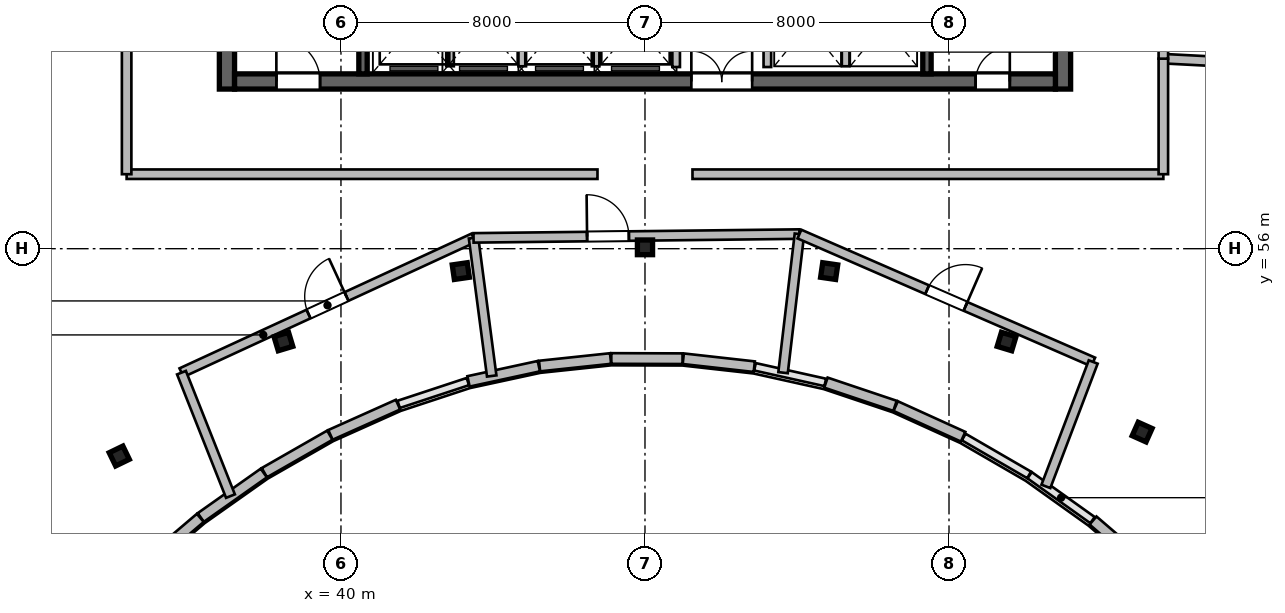
"""IFC4 building model, lengths in metres.
Left out: names, types, materials, properties, quantities, classifications, styles, units other than length and angle.
Written with IfcOpenShell. Run it as: python <this file> out.ifc"""

import sys

from ifc_helpers import new_model, si_unit, direction, frame, frame_2d, origin, origin_2d, place, context, subcontext, project, spatial, rectangle, i_section, extrude, source, transform, mapped, element, fill, save


model = new_model("IFC4")
c1 = context("Model", 3, precision=1e-05, world=origin(), true_north=direction((0.0, 1.0)))
c2 = subcontext(c1, "Body", "Model", "MODEL_VIEW")
j1 = project(units=[si_unit("LENGTHUNIT", "METRE"), si_unit("PLANEANGLEUNIT", "RADIAN")], contexts=[c1])
p1 = place(None, origin())
s1 = spatial("IfcSite", under=j1, at=p1, CompositionType="ELEMENT")
p2 = place(p1, origin())
s2 = spatial("IfcBuilding", under=s1, at=p2, CompositionType="ELEMENT")
p3 = place(p2, frame((0.0, 0.0, 264.0)))
s3 = spatial("IfcBuildingStorey", under=s2, at=p3, CompositionType="ELEMENT", Elevation=264.0)
m1 = source(origin(), c2, "Body", "SweptSolid", [
    extrude(rectangle(XDim=12.0, YDim=0.4, at=frame_2d((6.0, 0.0))), origin(), (0.0, 0.0, 1.0), 3.9),
])
for number, where, z_axis, x_axis in (
    (1, (37.0, 60.2, 0.0), (0.0, 0.0, 1.0), (0.0, 1.0, 0.0)),
    (2, (59.0, 60.2, 0.0), (0.0, 0.0, 1.0), (0.0, 1.0, 0.0)),
):
    element("IfcWall", number, at=place(p3, frame(where, z_axis=z_axis, x_axis=x_axis)), inside=s3, PredefinedType="SHEAR", context=c2, shape_type="MappedRepresentation", body=[
        mapped(m1, transform((0.0, 0.0, 0.0), scale=1.0)),
    ])
m2 = source(origin(), c2, "Body", "SweptSolid", [
    extrude(rectangle(XDim=21.6, YDim=0.4, at=frame_2d((10.8, 0.0))), origin(), (0.0, 0.0, 1.0), 3.9),
])
p4 = place(p3, frame((37.2, 60.4, 0.0), z_axis=(0.0, 0.0, 1.0), x_axis=(1.0, 0.0, 0.0)))
e3 = element("IfcWall", 3, at=p4, inside=s3, PredefinedType="SHEAR", context=c2, shape_type="MappedRepresentation", body=[
    mapped(m2, transform((0.0, 0.0, 0.0), scale=1.0)),
])
p5 = place(p4, frame((1.1, 0.0, 0.0)))
e4 = element("IfcOpeningElement", 4, at=p5, cuts=e3, PredefinedType="OPENING", context=c2, shape_type="SweptSolid", body=[
    extrude(rectangle(XDim=1.15, YDim=2.15, at=frame_2d((0.575, 1.075))), frame((0.0, 0.21, 0.0), z_axis=(0.0, -1.0, 0.0), x_axis=(1.0, 0.0, 0.0)), (0.0, 0.0, 1.0), 0.42),
])
p6 = place(p4, frame((19.5, 0.0, 0.0)))
e5 = element("IfcOpeningElement", 5, at=p6, cuts=e3, PredefinedType="OPENING", context=c2, shape_type="SweptSolid", body=[
    extrude(rectangle(XDim=0.9, YDim=2.1, at=frame_2d((0.45, 1.05))), frame((0.0, 0.21, 0.0), z_axis=(0.0, -1.0, 0.0), x_axis=(1.0, 0.0, 0.0)), (0.0, 0.0, 1.0), 0.42),
])
p7 = place(p4, frame((12.02, 0.0, 0.0)))
e6 = element("IfcOpeningElement", 6, at=p7, cuts=e3, PredefinedType="OPENING", context=c2, shape_type="SweptSolid", body=[
    extrude(rectangle(XDim=1.6, YDim=2.15, at=frame_2d((0.8, 1.075))), frame((0.0, 0.21, 0.0), z_axis=(0.0, -1.0, 0.0), x_axis=(1.0, 0.0, 0.0)), (0.0, 0.0, 1.0), 0.42),
])
m3 = source(origin(), c2, "Body", "SweptSolid", [
    extrude(rectangle(XDim=11.2, YDim=0.22, at=frame_2d((5.6, 0.0))), origin(), (0.0, 0.0, 1.0), 3.9),
])
p8 = place(p3, frame((40.58, 60.6, 0.0), z_axis=(0.0, 0.0, 1.0), x_axis=(0.0, 1.0, 0.0)))
e7 = element("IfcWall", 7, at=p8, inside=s3, PredefinedType="SHEAR", context=c2, shape_type="MappedRepresentation", body=[
    mapped(m3, transform((0.0, 0.0, 0.0), scale=1.0)),
])
p9 = place(p3, frame((55.42, 60.6, 0.0), z_axis=(0.0, 0.0, 1.0), x_axis=(0.0, 1.0, 0.0)))
e8 = element("IfcWall", 8, at=p9, inside=s3, PredefinedType="SHEAR", context=c2, shape_type="MappedRepresentation", body=[
    mapped(m3, transform((0.0, 0.0, 0.0), scale=1.0)),
])
p10 = place(p9, frame((9.645, 0.0, 0.0)))
e9 = element("IfcOpeningElement", 9, at=p10, cuts=e8, PredefinedType="OPENING", context=c2, shape_type="SweptSolid", body=[
    extrude(rectangle(XDim=1.15, YDim=2.15, at=frame_2d((0.575, 1.075))), frame((0.0, 0.12, 0.0), z_axis=(0.0, -1.0, 0.0), x_axis=(1.0, 0.0, 0.0)), (0.0, 0.0, 1.0), 0.24),
])
m4 = source(origin(), c2, "Body", "SweptSolid", [
    extrude(i_section(OverallWidth=0.399, OverallDepth=0.387, WebThickness=0.021, FlangeThickness=0.033, at=origin_2d()), origin(), (0.0, 0.0, 1.0), 3.9),
])
for number, where, z_axis, x_axis in (
    (10, (34.166, 50.545, 0.0), (0.0, 0.0, 1.0), (-0.436, 0.9, 0.0)),
    (11, (38.485, 53.558, 0.0), (0.0, 0.0, 1.0), (-0.289, 0.957, 0.0)),
    (12, (43.154, 55.411, 0.0), (0.0, 0.0, 1.0), (-0.143, 0.99, 0.0)),
    (13, (48.0, 56.036, 0.0), (0.0, 0.0, 1.0), (0.0, 1.0, 0.0)),
    (14, (52.846, 55.411, 0.0), (0.0, 0.0, 1.0), (0.143, 0.99, 0.0)),
    (15, (57.515, 53.558, 0.0), (0.0, 0.0, 1.0), (0.289, 0.957, 0.0)),
    (16, (61.082, 51.175, 0.0), (0.0, 0.0, 1.0), (0.409, 0.912, 0.0)),
):
    element("IfcColumn", number, at=place(p3, frame(where, z_axis=z_axis, x_axis=x_axis)), inside=s3, PredefinedType="COLUMN", context=c2, shape_type="MappedRepresentation", body=[
        mapped(m4, transform((0.0, 0.0, 0.0), scale=1.0)),
    ])
m5 = source(origin(), c2, "Body", "SweptSolid", [
    extrude(rectangle(XDim=2.04, YDim=0.28, at=frame_2d((1.02, 0.0))), origin(), (0.0, 0.0, 1.0), 3.65),
])
p11 = place(p3, frame((61.337, 47.519, 0.0), z_axis=(0.0, 0.0, 1.0), x_axis=(-0.758402847119, 0.651786101019, 0.0)))
e17 = element("IfcWall", 17, at=p11, inside=s3, PredefinedType="SOLIDWALL", context=c2, shape_type="MappedRepresentation", body=[
    mapped(m5, transform((0.0, 0.0, 0.0), scale=1.0)),
])
m6 = source(origin(), c2, "Body", "SweptSolid", [
    extrude(rectangle(XDim=1.95, YDim=0.28, at=frame_2d((0.975, 0.0))), origin(), (0.0, 0.0, 1.0), 3.65),
])
p12 = place(p3, frame((56.372, 51.052, 0.0), z_axis=(0.0, 0.0, 1.0), x_axis=(-0.910507945155, 0.413491574048, 0.0)))
e18 = element("IfcWall", 18, at=p12, inside=s3, PredefinedType="SOLIDWALL", context=c2, shape_type="MappedRepresentation", body=[
    mapped(m6, transform((0.0, 0.0, 0.0), scale=1.0)),
])
m7 = source(origin(), c2, "Body", "SweptSolid", [
    extrude(rectangle(XDim=1.918, YDim=0.28, at=frame_2d((0.959, 0.0))), origin(), (0.0, 0.0, 1.0), 3.65),
])
p13 = place(p3, frame((54.579, 51.865, 0.0), z_axis=(0.0, 0.0, 1.0), x_axis=(-0.947916697588, 0.318518342381, 0.0)))
e19 = element("IfcWall", 19, at=p13, inside=s3, PredefinedType="SOLIDWALL", context=c2, shape_type="MappedRepresentation", body=[
    mapped(m7, transform((0.0, 0.0, 0.0), scale=1.0)),
])
m8 = source(origin(), c2, "Body", "SweptSolid", [
    extrude(rectangle(XDim=1.879, YDim=0.28, at=frame_2d((0.94, 0.0))), origin(), (0.0, 0.0, 1.0), 3.65),
])
p14 = place(p3, frame((50.875, 52.896, 0.0), z_axis=(0.0, 0.0, 1.0), x_axis=(-0.993797887127, 0.111201436782, 0.0)))
e20 = element("IfcWall", 20, at=p14, inside=s3, PredefinedType="SOLIDWALL", context=c2, shape_type="MappedRepresentation", body=[
    mapped(m8, transform((0.0, 0.0, 0.0), scale=1.0)),
])
m9 = source(origin(), c2, "Body", "SweptSolid", [
    extrude(rectangle(XDim=1.874, YDim=0.28, at=frame_2d((0.937, 0.0))), origin(), (0.0, 0.0, 1.0), 3.65),
])
p15 = place(p3, frame((48.988, 53.106, 0.0), z_axis=(0.0, 0.0, 1.0), x_axis=(-0.999995893899, 0.002865690982, 0.0)))
e21 = element("IfcWall", 21, at=p15, inside=s3, PredefinedType="SOLIDWALL", context=c2, shape_type="MappedRepresentation", body=[
    mapped(m9, transform((0.0, 0.0, 0.0), scale=1.0)),
])
m10 = source(origin(), c2, "Body", "SweptSolid", [
    extrude(rectangle(XDim=1.879, YDim=0.28, at=frame_2d((0.939, 0.0))), origin(), (0.0, 0.0, 1.0), 3.65),
])
p16 = place(p3, frame((47.094, 53.11, 0.0), z_axis=(0.0, 0.0, 1.0), x_axis=(-0.994431872813, -0.105381451568, 0.0)))
e22 = element("IfcWall", 22, at=p16, inside=s3, PredefinedType="SOLIDWALL", context=c2, shape_type="MappedRepresentation", body=[
    mapped(m10, transform((0.0, 0.0, 0.0), scale=1.0)),
])
m11 = source(origin(), c2, "Body", "SweptSolid", [
    extrude(rectangle(XDim=1.893, YDim=0.28, at=frame_2d((0.947, 0.0))), origin(), (0.0, 0.0, 1.0), 3.65),
])
p17 = place(p3, frame((45.207, 52.909, 0.0), z_axis=(0.0, 0.0, 1.0), x_axis=(-0.977379595344, -0.21149261596, 0.0)))
e23 = element("IfcWall", 23, at=p17, inside=s3, PredefinedType="SOLIDWALL", context=c2, shape_type="MappedRepresentation", body=[
    mapped(m11, transform((0.0, 0.0, 0.0), scale=1.0)),
])
m12 = source(origin(), c2, "Body", "SweptSolid", [
    extrude(rectangle(XDim=1.948, YDim=0.28, at=frame_2d((0.974, 0.0))), origin(), (0.0, 0.0, 1.0), 3.65),
])
p18 = place(p3, frame((41.501, 51.897, 0.0), z_axis=(0.0, 0.0, 1.0), x_axis=(-0.912712483043, -0.408602402461, 0.0)))
e24 = element("IfcWall", 24, at=p18, inside=s3, PredefinedType="SOLIDWALL", context=c2, shape_type="MappedRepresentation", body=[
    mapped(m12, transform((0.0, 0.0, 0.0), scale=1.0)),
])
m13 = source(origin(), c2, "Body", "SweptSolid", [
    extrude(rectangle(XDim=1.986, YDim=0.28, at=frame_2d((0.993, 0.0))), origin(), (0.0, 0.0, 1.0), 3.65),
])
p19 = place(p3, frame((39.708, 51.093, 0.0), z_axis=(0.0, 0.0, 1.0), x_axis=(-0.867940364671, -0.496668423976, 0.0)))
e25 = element("IfcWall", 25, at=p19, inside=s3, PredefinedType="SOLIDWALL", context=c2, shape_type="MappedRepresentation", body=[
    mapped(m13, transform((0.0, 0.0, 0.0), scale=1.0)),
])
m14 = source(origin(), c2, "Body", "SweptSolid", [
    extrude(rectangle(XDim=2.03, YDim=0.28, at=frame_2d((1.015, 0.0))), origin(), (0.0, 0.0, 1.0), 3.65),
])
p20 = place(p3, frame((37.969, 50.097, 0.0), z_axis=(0.0, 0.0, 1.0), x_axis=(-0.816987864272, -0.576654861796, 0.0)))
e26 = element("IfcWall", 26, at=p20, inside=s3, PredefinedType="SOLIDWALL", context=c2, shape_type="MappedRepresentation", body=[
    mapped(m14, transform((0.0, 0.0, 0.0), scale=1.0)),
])
m15 = source(origin(), c2, "Body", "SweptSolid", [
    extrude(rectangle(XDim=2.078, YDim=0.28, at=frame_2d((1.039, 0.0))), origin(), (0.0, 0.0, 1.0), 3.65),
])
p21 = place(p3, frame((36.298, 48.917, 0.0), z_axis=(0.0, 0.0, 1.0), x_axis=(-0.761475215802, -0.648194026291, 0.0)))
e27 = element("IfcWall", 27, at=p21, inside=s3, PredefinedType="SOLIDWALL", context=c2, shape_type="MappedRepresentation", body=[
    mapped(m15, transform((0.0, 0.0, 0.0), scale=1.0)),
])
m16 = source(origin(), c2, "Body", "SweptSolid", [
    extrude(rectangle(XDim=2.24, YDim=0.2, at=frame_2d((1.12, 0.0))), origin(), (0.0, 0.0, 1.0), 3.65),
])
for number, where, z_axis, x_axis in (
    (28, (48.82, 60.78, 0.0), (0.0, 0.0, 1.0), (0.0, 1.0, 0.0)),
    (29, (51.22, 60.78, 0.0), (0.0, 0.0, 1.0), (0.0, 1.0, 0.0)),
):
    element("IfcWall", number, at=place(p3, frame(where, z_axis=z_axis, x_axis=x_axis)), inside=s3, PredefinedType="SOLIDWALL", context=c2, shape_type="MappedRepresentation", body=[
        mapped(m16, transform((0.0, 0.0, 0.0), scale=1.0)),
    ])
m17 = source(origin(), c2, "Body", "SweptSolid", [
    extrude(rectangle(XDim=2.2, YDim=0.2, at=frame_2d((1.1, 0.0))), origin(), (0.0, 0.0, 1.0), 3.65),
])
for number, where, z_axis, x_axis in (
    (30, (42.87, 60.8, 0.0), (0.0, 0.0, 1.0), (0.0, 1.0, 0.0)),
    (31, (44.77, 60.8, 0.0), (0.0, 0.0, 1.0), (0.0, 1.0, 0.0)),
    (32, (46.7, 60.8, 0.0), (0.0, 0.0, 1.0), (0.0, 1.0, 0.0)),
    (33, (53.28, 60.8, 0.0), (0.0, 0.0, 1.0), (0.0, 1.0, 0.0)),
):
    element("IfcWall", number, at=place(p3, frame(where, z_axis=z_axis, x_axis=x_axis)), inside=s3, PredefinedType="SOLIDWALL", context=c2, shape_type="MappedRepresentation", body=[
        mapped(m17, transform((0.0, 0.0, 0.0), scale=1.0)),
    ])
m18 = source(origin(), c2, "Body", "SweptSolid", [
    extrude(rectangle(XDim=8.464, YDim=0.25, at=frame_2d((4.232, 0.0))), origin(), (0.0, 0.0, 1.0), 3.65),
])
p22 = place(p3, frame((35.803, 52.738, 0.0), z_axis=(0.0, 0.0, 1.0), x_axis=(0.90801678306, 0.418933791524, 0.0)))
e34 = element("IfcWall", 34, at=p22, inside=s3, PredefinedType="PARTITIONING", context=c2, shape_type="MappedRepresentation", body=[
    mapped(m18, transform((0.0, 0.0, 0.0), scale=1.0)),
])
p23 = place(p22, frame((3.682, 0.0, 0.0)))
e35 = element("IfcOpeningElement", 35, at=p23, cuts=e34, PredefinedType="OPENING", context=c2, shape_type="SweptSolid", body=[
    extrude(rectangle(XDim=1.1, YDim=2.15, at=frame_2d((0.55, 1.075))), frame((0.0, 0.135, 0.0), z_axis=(0.0, -1.0, 0.0), x_axis=(1.0, 0.0, 0.0)), (0.0, 0.0, 1.0), 0.27),
])
m19 = source(origin(), c2, "Body", "SweptSolid", [
    extrude(rectangle(XDim=3.495, YDim=0.25, at=frame_2d((1.747, 0.0))), origin(), (0.0, 0.0, 1.0), 3.65),
])
p24 = place(p3, frame((37.092, 49.49, 0.0), z_axis=(0.0, 0.0, 1.0), x_axis=(-0.368859890644, 0.929485008526, 0.0)))
e36 = element("IfcWall", 36, at=p24, inside=s3, PredefinedType="PARTITIONING", context=c2, shape_type="MappedRepresentation", body=[
    mapped(m19, transform((0.0, 0.0, 0.0), scale=1.0)),
])
m20 = source(origin(), c2, "Body", "SweptSolid", [
    extrude(rectangle(XDim=3.665, YDim=0.25, at=frame_2d((1.832, 0.0))), origin(), (0.0, 0.0, 1.0), 3.65),
])
p25 = place(p3, frame((43.967, 52.651, 0.0), z_axis=(0.0, 0.0, 1.0), x_axis=(-0.130509659129, 0.991447037856, 0.0)))
e37 = element("IfcWall", 37, at=p25, inside=s3, PredefinedType="PARTITIONING", context=c2, shape_type="MappedRepresentation", body=[
    mapped(m20, transform((0.0, 0.0, 0.0), scale=1.0)),
])
m21 = source(origin(), c2, "Body", "SweptSolid", [
    extrude(rectangle(XDim=8.576, YDim=0.25, at=frame_2d((4.288, 0.0))), origin(), (0.0, 0.0, 1.0), 3.65),
])
p26 = place(p3, frame((43.489, 56.284, 0.0), z_axis=(0.0, 0.0, 1.0), x_axis=(0.999931553434, 0.011699933624, 0.0)))
e38 = element("IfcWall", 38, at=p26, inside=s3, PredefinedType="PARTITIONING", context=c2, shape_type="MappedRepresentation", body=[
    mapped(m21, transform((0.0, 0.0, 0.0), scale=1.0)),
])
p27 = place(p26, frame((2.988, 0.0, 0.0)))
e39 = element("IfcOpeningElement", 39, at=p27, cuts=e38, PredefinedType="OPENING", context=c2, shape_type="SweptSolid", body=[
    extrude(rectangle(XDim=1.1, YDim=2.15, at=frame_2d((0.55, 1.075))), frame((0.0, 0.135, 0.0), z_axis=(0.0, -1.0, 0.0), x_axis=(1.0, 0.0, 0.0)), (0.0, 0.0, 1.0), 0.27),
])
m22 = source(origin(), c2, "Body", "SweptSolid", [
    extrude(rectangle(XDim=3.672, YDim=0.25, at=frame_2d((1.836, 0.0))), origin(), (0.0, 0.0, 1.0), 3.65),
])
p28 = place(p3, frame((51.633, 52.738, 0.0), z_axis=(0.0, 0.0, 1.0), x_axis=(0.117362064027, 0.993089193339, 0.0)))
e40 = element("IfcWall", 40, at=p28, inside=s3, PredefinedType="PARTITIONING", context=c2, shape_type="MappedRepresentation", body=[
    mapped(m22, transform((0.0, 0.0, 0.0), scale=1.0)),
])
m23 = source(origin(), c2, "Body", "SweptSolid", [
    extrude(rectangle(XDim=8.431, YDim=0.25, at=frame_2d((4.216, 0.0))), origin(), (0.0, 0.0, 1.0), 3.65),
])
p29 = place(p3, frame((52.064, 56.385, 0.0), z_axis=(0.0, 0.0, 1.0), x_axis=(0.916868304583, -0.399189819574, 0.0)))
e41 = element("IfcWall", 41, at=p29, inside=s3, PredefinedType="PARTITIONING", context=c2, shape_type="MappedRepresentation", body=[
    mapped(m23, transform((0.0, 0.0, 0.0), scale=1.0)),
])
p30 = place(p29, frame((3.666, 0.0, 0.0)))
e42 = element("IfcOpeningElement", 42, at=p30, cuts=e41, PredefinedType="OPENING", context=c2, shape_type="SweptSolid", body=[
    extrude(rectangle(XDim=1.1, YDim=2.15, at=frame_2d((0.55, 1.075))), frame((0.0, 0.135, 0.0), z_axis=(0.0, -1.0, 0.0), x_axis=(1.0, 0.0, 0.0)), (0.0, 0.0, 1.0), 0.27),
])
m24 = source(origin(), c2, "Body", "SweptSolid", [
    extrude(rectangle(XDim=3.502, YDim=0.25, at=frame_2d((1.751, 0.0))), origin(), (0.0, 0.0, 1.0), 3.65),
])
p31 = place(p3, frame((58.55, 49.746, 0.0), z_axis=(0.0, 0.0, 1.0), x_axis=(0.35542122772, 0.934706237749, 0.0)))
e43 = element("IfcWall", 43, at=p31, inside=s3, PredefinedType="PARTITIONING", context=c2, shape_type="MappedRepresentation", body=[
    mapped(m24, transform((0.0, 0.0, 0.0), scale=1.0)),
])
m25 = source(origin(), c2, "Body", "SweptSolid", [
    extrude(rectangle(XDim=12.39, YDim=0.25, at=frame_2d((6.195, 0.0))), origin(), (0.0, 0.0, 1.0), 3.65),
])
for number, where, z_axis, x_axis in (
    (44, (34.36, 57.96, 0.0), (0.0, 0.0, 1.0), (1.0, 0.0, 0.0)),
    (45, (49.25, 57.96, 0.0), (0.0, 0.0, 1.0), (1.0, 0.0, 0.0)),
):
    element("IfcWall", number, at=place(p3, frame(where, z_axis=z_axis, x_axis=x_axis)), inside=s3, PredefinedType="PARTITIONING", context=c2, shape_type="MappedRepresentation", body=[
        mapped(m25, transform((0.0, 0.0, 0.0), scale=1.0)),
    ])
m26 = source(origin(), c2, "Body", "SweptSolid", [
    extrude(rectangle(XDim=4.04, YDim=0.25, at=frame_2d((2.02, 0.0))), origin(), (0.0, 0.0, 1.0), 3.65),
])
p32 = place(p3, frame((34.36, 57.96, 0.0), z_axis=(0.0, 0.0, 1.0), x_axis=(0.0, 1.0, 0.0)))
e46 = element("IfcWall", 46, at=p32, inside=s3, PredefinedType="PARTITIONING", context=c2, shape_type="MappedRepresentation", body=[
    mapped(m26, transform((0.0, 0.0, 0.0), scale=1.0)),
])
m27 = source(origin(), c2, "Body", "SweptSolid", [
    extrude(rectangle(XDim=12.938, YDim=0.25, at=frame_2d((6.469, 0.0))), origin(), (0.0, 0.0, 1.0), 3.65),
])
p33 = place(p3, frame((61.64, 61.0, 0.0), z_axis=(0.0, 0.0, 1.0), x_axis=(0.998643821866, -0.052062626215, 0.0)))
e47 = element("IfcWall", 47, at=p33, inside=s3, PredefinedType="PARTITIONING", context=c2, shape_type="MappedRepresentation", body=[
    mapped(m27, transform((0.0, 0.0, 0.0), scale=1.0)),
])
m28 = source(origin(), c2, "Body", "SweptSolid", [
    extrude(rectangle(XDim=3.04, YDim=0.25, at=frame_2d((1.52, 0.0))), origin(), (0.0, 0.0, 1.0), 3.65),
])
p34 = place(p3, frame((61.64, 57.96, 0.0), z_axis=(0.0, 0.0, 1.0), x_axis=(0.0, 1.0, 0.0)))
e48 = element("IfcWall", 48, at=p34, inside=s3, PredefinedType="PARTITIONING", context=c2, shape_type="MappedRepresentation", body=[
    mapped(m28, transform((0.0, 0.0, 0.0), scale=1.0)),
])
m29 = source(origin(), c2, "Body", "SweptSolid", [
    extrude(rectangle(XDim=3.8, YDim=0.25, at=frame_2d((1.9, 0.0))), origin(), (0.0, 0.0, 1.0), 3.65),
])
p35 = place(p3, frame((61.64, 61.0, 0.0), z_axis=(0.0, 0.0, 1.0), x_axis=(0.0, 1.0, 0.0)))
e49 = element("IfcWall", 49, at=p35, inside=s3, PredefinedType="PARTITIONING", context=c2, shape_type="MappedRepresentation", body=[
    mapped(m29, transform((0.0, 0.0, 0.0), scale=1.0)),
])
p36 = place(p35, frame((0.969, 0.0, 0.0)))
e50 = element("IfcOpeningElement", 50, at=p36, cuts=e49, PredefinedType="OPENING", context=c2, shape_type="SweptSolid", body=[
    extrude(rectangle(XDim=0.95, YDim=2.1, at=frame_2d((0.475, 1.05))), frame((0.0, 0.135, 0.0), z_axis=(0.0, -1.0, 0.0), x_axis=(1.0, 0.0, 0.0)), (0.0, 0.0, 1.0), 0.27),
])
m30 = source(origin(), c2, "Body", "SweptSolid", [
    extrude(rectangle(XDim=1.15, YDim=2.15, at=frame_2d((0.575, 1.075))), frame((0.0, 0.025, 0.0), z_axis=(0.0, -1.0, 0.0), x_axis=(1.0, 0.0, 0.0)), (0.0, 0.0, 1.0), 0.05),
])
p37 = place(p5, origin())
e51 = element("IfcDoor", 51, at=p37, inside=s3, OperationType="SINGLE_SWING_LEFT", PredefinedType="DOOR", context=c2, shape_type="MappedRepresentation", body=[
    mapped(m30, transform((0.0, 0.0, 0.0), scale=1.0)),
])
fill(e4, e51)
m31 = source(origin(), c2, "Body", "SweptSolid", [
    extrude(rectangle(XDim=0.9, YDim=2.1, at=frame_2d((0.45, 1.05))), frame((0.0, 0.025, 0.0), z_axis=(0.0, -1.0, 0.0), x_axis=(1.0, 0.0, 0.0)), (0.0, 0.0, 1.0), 0.05),
])
p38 = place(p6, origin())
e52 = element("IfcDoor", 52, at=p38, inside=s3, OperationType="SINGLE_SWING_RIGHT", PredefinedType="DOOR", context=c2, shape_type="MappedRepresentation", body=[
    mapped(m31, transform((0.0, 0.0, 0.0), scale=1.0)),
])
fill(e5, e52)
m32 = source(origin(), c2, "Body", "SweptSolid", [
    extrude(rectangle(XDim=1.6, YDim=2.15, at=frame_2d((0.8, 1.075))), frame((0.0, 0.025, 0.0), z_axis=(0.0, -1.0, 0.0), x_axis=(1.0, 0.0, 0.0)), (0.0, 0.0, 1.0), 0.05),
])
p39 = place(p7, origin())
e53 = element("IfcDoor", 53, at=p39, inside=s3, OperationType="DOUBLE_DOOR_SINGLE_SWING", PredefinedType="DOOR", context=c2, shape_type="MappedRepresentation", body=[
    mapped(m32, transform((0.0, 0.0, 0.0), scale=1.0)),
])
fill(e6, e53)
m33 = source(origin(), c2, "Body", "SweptSolid", [
    extrude(rectangle(XDim=1.1, YDim=2.15, at=frame_2d((0.55, 1.075))), frame((0.0, 0.025, 0.0), z_axis=(0.0, -1.0, 0.0), x_axis=(1.0, 0.0, 0.0)), (0.0, 0.0, 1.0), 0.05),
])
p40 = place(p23, origin())
e54 = element("IfcDoor", 54, at=p40, inside=s3, OperationType="SINGLE_SWING_RIGHT", PredefinedType="DOOR", context=c2, shape_type="MappedRepresentation", body=[
    mapped(m33, transform((0.0, 0.0, 0.0), scale=1.0)),
])
fill(e35, e54)
p41 = place(p27, origin())
e55 = element("IfcDoor", 55, at=p41, inside=s3, OperationType="SINGLE_SWING_LEFT", PredefinedType="DOOR", context=c2, shape_type="MappedRepresentation", body=[
    mapped(m33, transform((0.0, 0.0, 0.0), scale=1.0)),
])
fill(e39, e55)
p42 = place(p30, origin())
e56 = element("IfcDoor", 56, at=p42, inside=s3, OperationType="SINGLE_SWING_RIGHT", PredefinedType="DOOR", context=c2, shape_type="MappedRepresentation", body=[
    mapped(m33, transform((0.0, 0.0, 0.0), scale=1.0)),
])
fill(e42, e56)
save(model, sys.argv[1])
